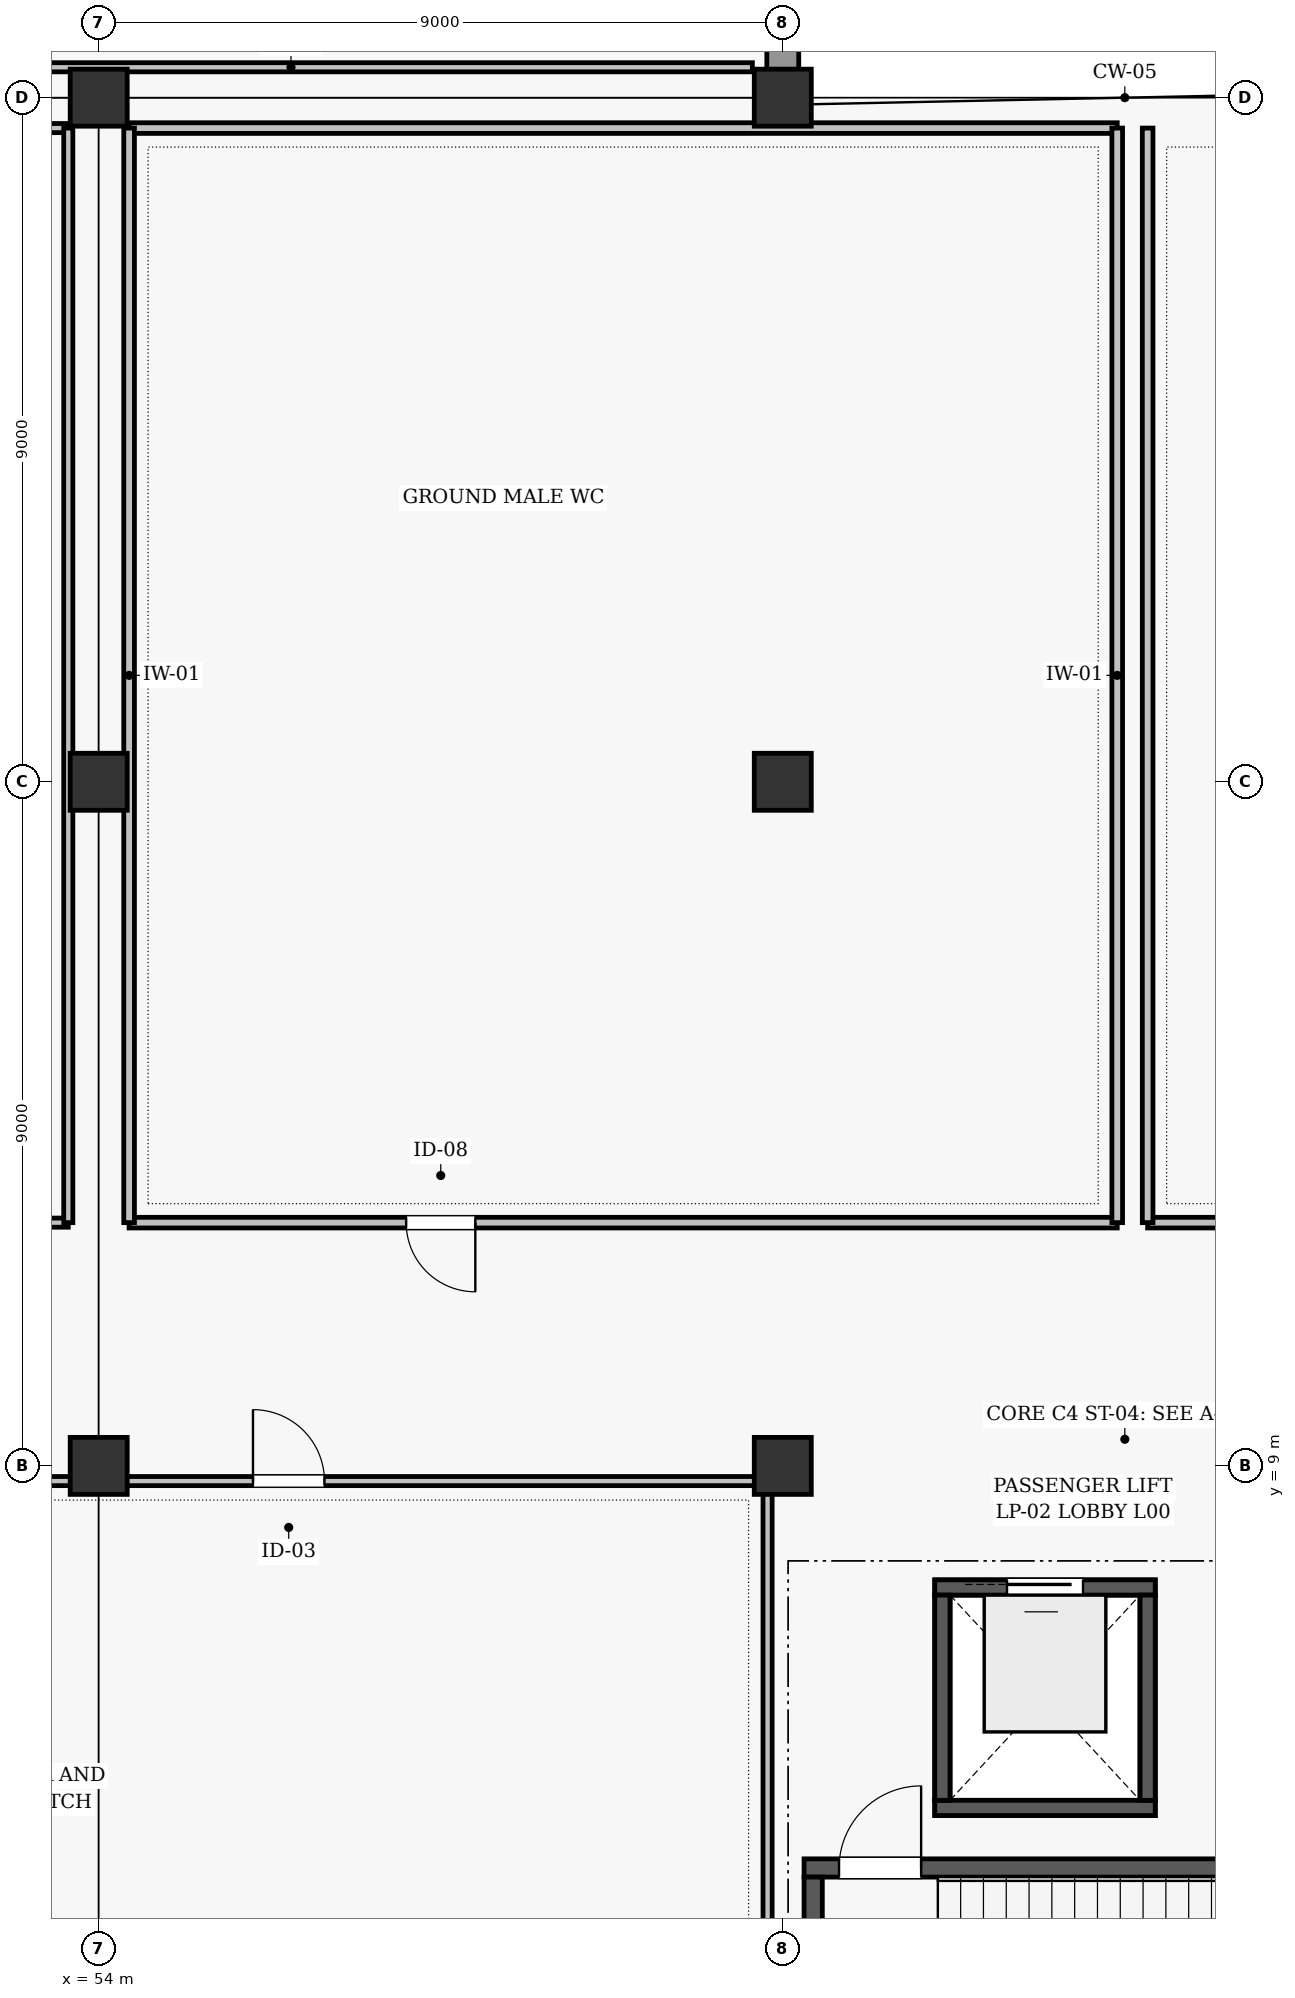
"""IFC4 building model, lengths in metres.
Left out: names, types, materials, properties, quantities, classifications, styles, units other than length and angle.
Written with IfcOpenShell. Run it as: python <this file> out.ifc"""

import sys

from ifc_helpers import new_model, si_unit, direction, frame, frame_2d, origin, origin_2d, place, context, subcontext, project, spatial, rectangle, extrude, element, fill, save


model = new_model("IFC4")
c1 = context("Model", 3, precision=1e-05, world=origin(), true_north=direction((0.0, 1.0)))
c2 = subcontext(c1, "Body", "Model", "MODEL_VIEW")
j1 = project(units=[si_unit("LENGTHUNIT", "METRE"), si_unit("PLANEANGLEUNIT", "RADIAN")], contexts=[c1])
p1 = place(None, origin())
s1 = spatial("IfcSite", under=j1, at=p1, CompositionType="ELEMENT")
p2 = place(p1, origin())
s2 = spatial("IfcBuilding", under=s1, at=p2, CompositionType="ELEMENT")
p3 = place(p2, origin())
s3 = spatial("IfcBuildingStorey", under=s2, at=p3, CompositionType="ELEMENT", Elevation=0.0)
for number, where, z_axis, x_axis in (
    (1, (54.0, 9.0, 0.0), (0.0, 0.0, 1.0), (1.0, 0.0, 0.0)),
    (2, (54.0, 18.0, 0.0), (0.0, 0.0, 1.0), (1.0, 0.0, 0.0)),
    (3, (54.0, 27.0, 0.0), (0.0, 0.0, 1.0), (1.0, 0.0, 0.0)),
    (4, (63.0, 9.0, 0.0), (0.0, 0.0, 1.0), (1.0, 0.0, 0.0)),
    (5, (63.0, 18.0, 0.0), (0.0, 0.0, 1.0), (1.0, 0.0, 0.0)),
    (6, (63.0, 27.0, 0.0), (0.0, 0.0, 1.0), (1.0, 0.0, 0.0)),
):
    element("IfcColumn", number, at=place(p3, frame(where, z_axis=z_axis, x_axis=x_axis)), inside=s3, PredefinedType="COLUMN", context=c2, shape_type="SweptSolid", body=[
        extrude(rectangle(XDim=0.75, YDim=0.75, at=origin_2d()), origin(), (0.0, 0.0, 1.0), 4.8),
    ])
p4 = place(p3, frame((63.0, 27.373, 0.0), z_axis=(0.0, 0.0, 1.0), x_axis=(0.0, 1.0, 0.0)))
e7 = element("IfcWall", 7, at=p4, inside=s3, PredefinedType="SOLIDWALL", context=c2, shape_type="SweptSolid", body=[
    extrude(rectangle(XDim=8.254, YDim=0.42, at=frame_2d((4.127, 0.0))), origin(), (0.0, 0.0, 1.0), 4.042),
])
p5 = place(p4, frame((1.911, 0.0, 0.85)))
e8 = element("IfcOpeningElement", 8, at=p5, cuts=e7, PredefinedType="OPENING", context=c2, shape_type="SweptSolid", body=[
    extrude(rectangle(XDim=1.26, YDim=1.46, at=frame_2d((0.63, 0.73))), frame((0.0, 0.22, 0.0), z_axis=(0.0, -1.0, 0.0), x_axis=(1.0, 0.0, 0.0)), (0.0, 0.0, 1.0), 0.44),
])
p6 = place(p4, frame((5.083, 0.0, 0.85)))
e9 = element("IfcOpeningElement", 9, at=p6, cuts=e7, PredefinedType="OPENING", context=c2, shape_type="SweptSolid", body=[
    extrude(rectangle(XDim=1.26, YDim=1.46, at=frame_2d((0.63, 0.73))), frame((0.0, 0.22, 0.0), z_axis=(0.0, -1.0, 0.0), x_axis=(1.0, 0.0, 0.0)), (0.0, 0.0, 1.0), 0.44),
])
p7 = place(p3, frame((63.28, 3.71, 0.0), z_axis=(0.0, 0.0, 1.0), x_axis=(1.0, 0.0, 0.0)))
e10 = element("IfcWall", 10, at=p7, inside=s3, PredefinedType="SHEAR", context=c2, shape_type="SweptSolid", body=[
    extrude(rectangle(XDim=8.44, YDim=0.24, at=frame_2d((4.22, 0.0))), origin(), (0.0, 0.0, 1.0), 4.55),
])
p8 = place(p7, frame((0.46, 0.0, 0.0)))
e11 = element("IfcOpeningElement", 11, at=p8, cuts=e10, PredefinedType="OPENING", context=c2, shape_type="SweptSolid", body=[
    extrude(rectangle(XDim=1.08, YDim=2.08, at=frame_2d((0.54, 1.04))), frame((0.0, 0.13, 0.0), z_axis=(0.0, -1.0, 0.0), x_axis=(1.0, 0.0, 0.0)), (0.0, 0.0, 1.0), 0.26),
])
p9 = place(p3, frame((63.4, 0.4, 0.0), z_axis=(0.0, 0.0, 1.0), x_axis=(0.0, 1.0, 0.0)))
e12 = element("IfcWall", 12, at=p9, inside=s3, PredefinedType="SHEAR", context=c2, shape_type="SweptSolid", body=[
    extrude(rectangle(XDim=3.19, YDim=0.24, at=frame_2d((1.595, 0.0))), origin(), (0.0, 0.0, 1.0), 4.55),
])
for number, where, z_axis, x_axis in (
    (13, (65.0, 4.5, -1.4), (0.0, 0.0, 1.0), (1.0, 0.0, 0.0)),
    (14, (65.0, 7.4, -1.4), (0.0, 0.0, 1.0), (1.0, 0.0, 0.0)),
):
    element("IfcWall", number, at=place(p3, frame(where, z_axis=z_axis, x_axis=x_axis)), inside=s3, PredefinedType="SHEAR", context=c2, shape_type="SweptSolid", body=[
        extrude(rectangle(XDim=2.9, YDim=0.2, at=frame_2d((1.45, 0.0))), origin(), (0.0, 0.0, 1.0), 1.1),
    ])
for number, where, z_axis, x_axis in (
    (15, (65.1, 4.6, -1.4), (0.0, 0.0, 1.0), (0.0, 1.0, 0.0)),
    (16, (67.8, 4.6, -1.4), (0.0, 0.0, 1.0), (0.0, 1.0, 0.0)),
):
    element("IfcWall", number, at=place(p3, frame(where, z_axis=z_axis, x_axis=x_axis)), inside=s3, PredefinedType="SHEAR", context=c2, shape_type="SweptSolid", body=[
        extrude(rectangle(XDim=2.7, YDim=0.2, at=frame_2d((1.35, 0.0))), origin(), (0.0, 0.0, 1.0), 1.1),
    ])
p10 = place(p3, frame((65.0, 4.5, 0.0), z_axis=(0.0, 0.0, 1.0), x_axis=(1.0, 0.0, 0.0)))
e17 = element("IfcWall", 17, at=p10, inside=s3, PredefinedType="SHEAR", context=c2, shape_type="SweptSolid", body=[
    extrude(rectangle(XDim=2.9, YDim=0.2, at=frame_2d((1.45, 0.0))), origin(), (0.0, 0.0, 1.0), 4.55),
])
p11 = place(p3, frame((65.0, 7.4, 0.0), z_axis=(0.0, 0.0, 1.0), x_axis=(1.0, 0.0, 0.0)))
e18 = element("IfcWall", 18, at=p11, inside=s3, PredefinedType="SHEAR", context=c2, shape_type="SweptSolid", body=[
    extrude(rectangle(XDim=2.9, YDim=0.2, at=frame_2d((1.45, 0.0))), origin(), (0.0, 0.0, 1.0), 4.55),
])
p12 = place(p11, frame((0.95, 0.0, 0.0)))
e19 = element("IfcOpeningElement", 19, at=p12, cuts=e18, PredefinedType="OPENING", context=c2, shape_type="SweptSolid", body=[
    extrude(rectangle(XDim=1.0, YDim=2.1, at=frame_2d((0.5, 1.05))), frame((0.0, 0.11, 0.0), z_axis=(0.0, -1.0, 0.0), x_axis=(1.0, 0.0, 0.0)), (0.0, 0.0, 1.0), 0.22),
])
for number, where, z_axis, x_axis in (
    (20, (65.1, 4.6, 0.0), (0.0, 0.0, 1.0), (0.0, 1.0, 0.0)),
    (21, (67.8, 4.6, 0.0), (0.0, 0.0, 1.0), (0.0, 1.0, 0.0)),
):
    element("IfcWall", number, at=place(p3, frame(where, z_axis=z_axis, x_axis=x_axis)), inside=s3, PredefinedType="SHEAR", context=c2, shape_type="SweptSolid", body=[
        extrude(rectangle(XDim=2.7, YDim=0.2, at=frame_2d((1.35, 0.0))), origin(), (0.0, 0.0, 1.0), 4.55),
    ])
p13 = place(p3, frame((45.2, 8.8, 0.0), z_axis=(0.0, 0.0, 1.0), x_axis=(1.0, 0.0, 0.0)))
e22 = element("IfcWall", 22, at=p13, inside=s3, PredefinedType="PARTITIONING", context=c2, shape_type="SweptSolid", body=[
    extrude(rectangle(XDim=17.6, YDim=0.12, at=frame_2d((8.8, 0.0))), origin(), (0.0, 0.0, 1.0), 3.795),
])
p14 = place(p13, frame((10.83, 0.0, 0.0)))
e23 = element("IfcOpeningElement", 23, at=p14, cuts=e22, PredefinedType="OPENING", context=c2, shape_type="SweptSolid", body=[
    extrude(rectangle(XDim=0.94, YDim=2.06, at=frame_2d((0.47, 1.03))), frame((0.0, 0.07, 0.0), z_axis=(0.0, -1.0, 0.0), x_axis=(1.0, 0.0, 0.0)), (0.0, 0.0, 1.0), 0.14),
])
p15 = place(p3, frame((62.8, 0.4, 0.0), z_axis=(0.0, 0.0, 1.0), x_axis=(0.0, 1.0, 0.0)))
e24 = element("IfcWall", 24, at=p15, inside=s3, PredefinedType="PARTITIONING", context=c2, shape_type="SweptSolid", body=[
    extrude(rectangle(XDim=8.4, YDim=0.12, at=frame_2d((4.2, 0.0))), origin(), (0.0, 0.0, 1.0), 3.895),
])
p16 = place(p3, frame((36.4, 12.2, 0.0), z_axis=(0.0, 0.0, 1.0), x_axis=(1.0, 0.0, 0.0)))
e25 = element("IfcWall", 25, at=p16, inside=s3, PredefinedType="PARTITIONING", context=c2, shape_type="SweptSolid", body=[
    extrude(rectangle(XDim=17.2, YDim=0.12, at=frame_2d((8.6, 0.0))), origin(), (0.0, 0.0, 1.0), 3.895),
])
p17 = place(p16, frame((10.61, 0.0, 0.0)))
e26 = element("IfcOpeningElement", 26, at=p17, cuts=e25, PredefinedType="OPENING", context=c2, shape_type="SweptSolid", body=[
    extrude(rectangle(XDim=0.98, YDim=2.08, at=frame_2d((0.49, 1.04))), frame((0.0, 0.07, 0.0), z_axis=(0.0, -1.0, 0.0), x_axis=(1.0, 0.0, 0.0)), (0.0, 0.0, 1.0), 0.14),
])
p18 = place(p3, frame((36.4, 26.6, 0.0), z_axis=(0.0, 0.0, 1.0), x_axis=(1.0, 0.0, 0.0)))
e27 = element("IfcWall", 27, at=p18, inside=s3, PredefinedType="PARTITIONING", context=c2, shape_type="SweptSolid", body=[
    extrude(rectangle(XDim=17.2, YDim=0.12, at=frame_2d((8.6, 0.0))), origin(), (0.0, 0.0, 1.0), 3.895),
])
p19 = place(p3, frame((53.6, 12.2, 0.0), z_axis=(0.0, 0.0, 1.0), x_axis=(0.0, 1.0, 0.0)))
e28 = element("IfcWall", 28, at=p19, inside=s3, PredefinedType="PARTITIONING", context=c2, shape_type="SweptSolid", body=[
    extrude(rectangle(XDim=14.4, YDim=0.12, at=frame_2d((7.2, 0.0))), origin(), (0.0, 0.0, 1.0), 3.795),
])
p20 = place(p3, frame((54.4, 12.2, 0.0), z_axis=(0.0, 0.0, 1.0), x_axis=(1.0, 0.0, 0.0)))
e29 = element("IfcWall", 29, at=p20, inside=s3, PredefinedType="PARTITIONING", context=c2, shape_type="SweptSolid", body=[
    extrude(rectangle(XDim=13.0, YDim=0.14, at=frame_2d((6.5, 0.0))), origin(), (0.0, 0.0, 1.0), 3.895),
])
p21 = place(p20, frame((3.645, 0.0, 0.0)))
e30 = element("IfcOpeningElement", 30, at=p21, cuts=e29, PredefinedType="OPENING", context=c2, shape_type="SweptSolid", body=[
    extrude(rectangle(XDim=0.91, YDim=2.04, at=frame_2d((0.455, 1.02))), frame((0.0, 0.08, 0.0), z_axis=(0.0, -1.0, 0.0), x_axis=(1.0, 0.0, 0.0)), (0.0, 0.0, 1.0), 0.16),
])
p22 = place(p3, frame((54.4, 26.6, 0.0), z_axis=(0.0, 0.0, 1.0), x_axis=(1.0, 0.0, 0.0)))
e31 = element("IfcWall", 31, at=p22, inside=s3, PredefinedType="PARTITIONING", context=c2, shape_type="SweptSolid", body=[
    extrude(rectangle(XDim=13.0, YDim=0.14, at=frame_2d((6.5, 0.0))), origin(), (0.0, 0.0, 1.0), 3.895),
])
for number, where, z_axis, x_axis in (
    (32, (54.4, 12.2, 0.0), (0.0, 0.0, 1.0), (0.0, 1.0, 0.0)),
    (33, (67.4, 12.2, 0.0), (0.0, 0.0, 1.0), (0.0, 1.0, 0.0)),
):
    element("IfcWall", number, at=place(p3, frame(where, z_axis=z_axis, x_axis=x_axis)), inside=s3, PredefinedType="PARTITIONING", context=c2, shape_type="SweptSolid", body=[
        extrude(rectangle(XDim=14.4, YDim=0.14, at=frame_2d((7.2, 0.0))), origin(), (0.0, 0.0, 1.0), 3.795),
    ])
p23 = place(p3, frame((67.8, 12.2, 0.0), z_axis=(0.0, 0.0, 1.0), x_axis=(1.0, 0.0, 0.0)))
e34 = element("IfcWall", 34, at=p23, inside=s3, PredefinedType="PARTITIONING", context=c2, shape_type="SweptSolid", body=[
    extrude(rectangle(XDim=12.8, YDim=0.14, at=frame_2d((6.4, 0.0))), origin(), (0.0, 0.0, 1.0), 3.895),
])
p24 = place(p23, frame((8.245, 0.0, 0.0)))
e35 = element("IfcOpeningElement", 35, at=p24, cuts=e34, PredefinedType="OPENING", context=c2, shape_type="SweptSolid", body=[
    extrude(rectangle(XDim=0.91, YDim=2.04, at=frame_2d((0.455, 1.02))), frame((0.0, 0.08, 0.0), z_axis=(0.0, -1.0, 0.0), x_axis=(1.0, 0.0, 0.0)), (0.0, 0.0, 1.0), 0.16),
])
p25 = place(p3, frame((67.8, 12.2, 0.0), z_axis=(0.0, 0.0, 1.0), x_axis=(0.0, 1.0, 0.0)))
e36 = element("IfcWall", 36, at=p25, inside=s3, PredefinedType="PARTITIONING", context=c2, shape_type="SweptSolid", body=[
    extrude(rectangle(XDim=14.4, YDim=0.14, at=frame_2d((7.2, 0.0))), origin(), (0.0, 0.0, 1.0), 3.795),
])
p26 = place(p3, frame((36.4, 27.4, 0.0), z_axis=(0.0, 0.0, 1.0), x_axis=(1.0, 0.0, 0.0)))
e37 = element("IfcWall", 37, at=p26, inside=s3, PredefinedType="PARTITIONING", context=c2, shape_type="SweptSolid", body=[
    extrude(rectangle(XDim=26.2, YDim=0.12, at=frame_2d((13.1, 0.0))), origin(), (0.0, 0.0, 1.0), 3.895),
])
p27 = place(p26, frame((12.29, 0.0, 0.0)))
e38 = element("IfcOpeningElement", 38, at=p27, cuts=e37, PredefinedType="OPENING", context=c2, shape_type="SweptSolid", body=[
    extrude(rectangle(XDim=1.62, YDim=2.14, at=frame_2d((0.81, 1.07))), frame((0.0, 0.07, 0.0), z_axis=(0.0, -1.0, 0.0), x_axis=(1.0, 0.0, 0.0)), (0.0, 0.0, 1.0), 0.14),
])
p28 = place(p8, origin())
e39 = element("IfcDoor", 39, at=p28, inside=s3, OperationType="SINGLE_SWING_RIGHT", PredefinedType="DOOR", context=c2, shape_type="SweptSolid", body=[
    extrude(rectangle(XDim=1.08, YDim=2.08, at=frame_2d((0.54, 1.04))), frame((0.0, 0.025, 0.0), z_axis=(0.0, -1.0, 0.0), x_axis=(1.0, 0.0, 0.0)), (0.0, 0.0, 1.0), 0.05),
])
fill(e11, e39)
p29 = place(p12, origin())
e40 = element("IfcDoor", 40, at=p29, inside=s3, OperationType="SLIDING_TO_LEFT", PredefinedType="DOOR", context=c2, shape_type="SweptSolid", body=[
    extrude(rectangle(XDim=1.0, YDim=2.1, at=frame_2d((0.5, 1.05))), frame((0.0, 0.025, 0.0), z_axis=(0.0, -1.0, 0.0), x_axis=(1.0, 0.0, 0.0)), (0.0, 0.0, 1.0), 0.05),
])
fill(e19, e40)
p30 = place(p14, origin())
e41 = element("IfcDoor", 41, at=p30, inside=s3, OperationType="SINGLE_SWING_LEFT", PredefinedType="DOOR", context=c2, shape_type="SweptSolid", body=[
    extrude(rectangle(XDim=0.94, YDim=2.06, at=frame_2d((0.47, 1.03))), frame((0.0, 0.025, 0.0), z_axis=(0.0, -1.0, 0.0), x_axis=(1.0, 0.0, 0.0)), (0.0, 0.0, 1.0), 0.05),
])
fill(e23, e41)
p31 = place(p21, frame((0.91, 0.0, 0.0), z_axis=(0.0, 0.0, 1.0), x_axis=(-1.0, 0.0, 0.0)))
e42 = element("IfcDoor", 42, at=p31, inside=s3, OperationType="SINGLE_SWING_RIGHT", PredefinedType="DOOR", context=c2, shape_type="SweptSolid", body=[
    extrude(rectangle(XDim=0.91, YDim=2.04, at=frame_2d((0.455, 1.02))), frame((0.0, 0.025, 0.0), z_axis=(0.0, -1.0, 0.0), x_axis=(1.0, 0.0, 0.0)), (0.0, 0.0, 1.0), 0.05),
])
fill(e30, e42)
save(model, sys.argv[1])
